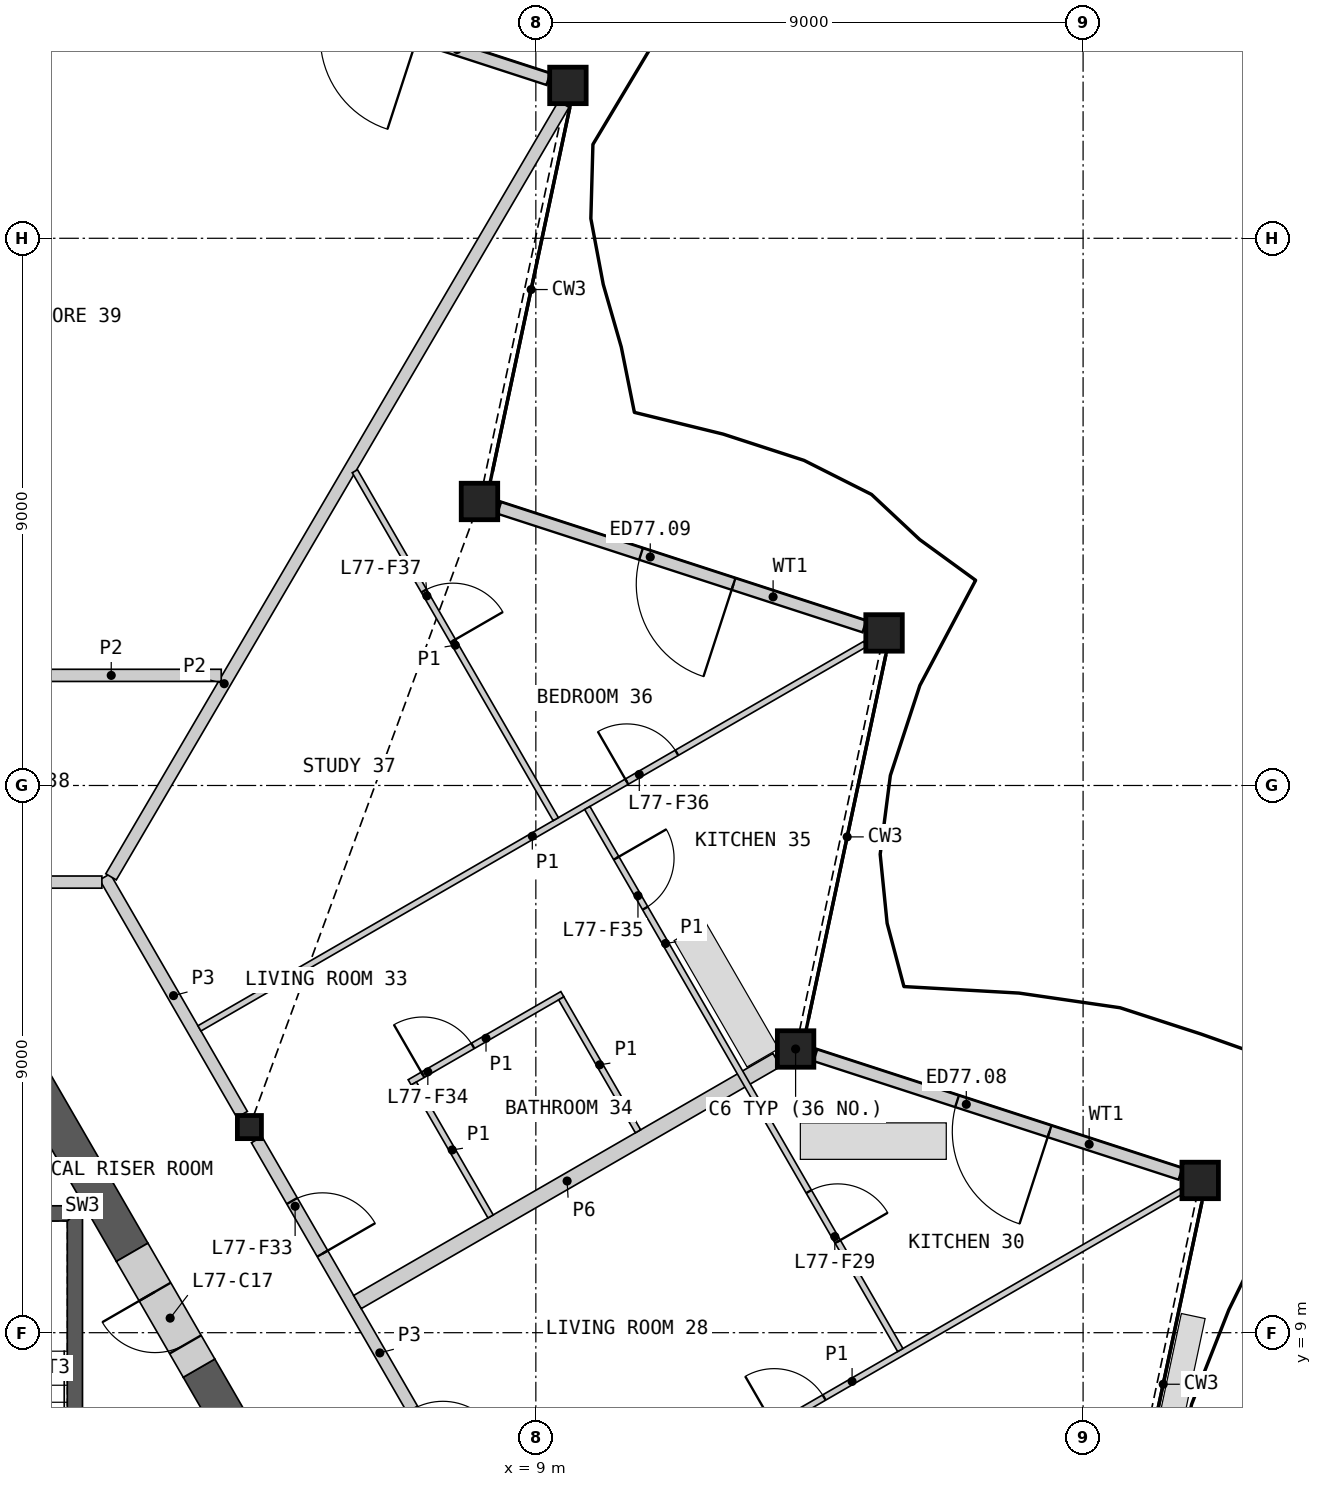
"""IFC4 building model, lengths in metres.
Left out: names, types, materials, properties, quantities, classifications, styles, units other than length and angle.
Written with IfcOpenShell. Run it as: python <this file> out.ifc"""

import sys

from ifc_helpers import new_model, si_unit, direction, frame, frame_2d, origin, origin_2d, place, context, subcontext, project, spatial, polyline, rectangle, hollow_rectangle, i_section, outline, extrude, element, fill, save


model = new_model("IFC4")
c1 = context("Model", 3, precision=1e-05, world=origin(), true_north=direction((0.0, 1.0)))
c2 = subcontext(c1, "Body", "Model", "MODEL_VIEW")
j1 = project(units=[si_unit("LENGTHUNIT", "METRE"), si_unit("PLANEANGLEUNIT", "RADIAN")], contexts=[c1])
p1 = place(None, origin())
s1 = spatial("IfcSite", under=j1, at=p1, CompositionType="ELEMENT")
p2 = place(p1, origin())
s2 = spatial("IfcBuilding", under=s1, at=p2, CompositionType="ELEMENT")
p3 = place(p2, frame((0.0, 0.0, 342.6)))
s3 = spatial("IfcBuildingStorey", under=s2, at=p3, CompositionType="ELEMENT", Elevation=342.6)
for number, where, z_axis, x_axis in (
    (1, (19.926, 11.504, 0.0), (0.0, 0.0, 1.0), (1.0, 0.0, 0.0)),
    (2, (13.272, 13.666, 0.0), (0.0, 0.0, 1.0), (1.0, 0.0, 0.0)),
    (3, (14.727, 20.509, 0.0), (0.0, 0.0, 1.0), (1.0, 0.0, 0.0)),
    (4, (8.073, 22.671, 0.0), (0.0, 0.0, 1.0), (1.0, 0.0, 0.0)),
    (5, (9.527, 29.514, 0.0), (0.0, 0.0, 1.0), (1.0, 0.0, 0.0)),
):
    element("IfcColumn", number, at=place(p3, frame(where, z_axis=z_axis, x_axis=x_axis)), inside=s3, PredefinedType="COLUMN", context=c2, shape_type="SweptSolid", body=[
        extrude(hollow_rectangle(XDim=0.6, YDim=0.6, WallThickness=0.04, at=origin_2d()), origin(), (0.0, 0.0, 1.0), 3.4),
    ])
p4 = place(p3, frame((4.289, 12.382, 0.0), z_axis=(0.0, 0.0, 1.0), x_axis=(1.0, 0.0, 0.0)))
e6 = element("IfcColumn", 6, at=p4, inside=s3, PredefinedType="COLUMN", context=c2, shape_type="SweptSolid", body=[
    extrude(i_section(OverallWidth=0.396, OverallDepth=0.381, WebThickness=0.019, FlangeThickness=0.03, at=origin_2d()), origin(), (0.0, 0.0, 1.0), 3.4),
])
p5 = place(p3, frame((19.601, 11.612, 0.0), z_axis=(0.0, 0.0, 1.0), x_axis=(-0.951065041052, 0.308990756638, 0.0)))
e7 = element("IfcWall", 7, at=p5, inside=s3, PredefinedType="SOLIDWALL", context=c2, shape_type="SweptSolid", body=[
    extrude(rectangle(XDim=6.313, YDim=0.2, at=frame_2d((3.156, 0.0))), origin(), (0.0, 0.0, 1.0), 2.488),
])
p6 = place(p5, frame((2.263, 0.0, 0.0)))
e8 = element("IfcOpeningElement", 8, at=p6, cuts=e7, PredefinedType="OPENING", context=c2, shape_type="SweptSolid", body=[
    extrude(rectangle(XDim=1.6, YDim=2.25, at=frame_2d((0.8, 1.125))), frame((0.0, 0.11, 0.0), z_axis=(0.0, -1.0, 0.0), x_axis=(1.0, 0.0, 0.0)), (0.0, 0.0, 1.0), 0.22),
])
p7 = place(p3, frame((14.403, 20.614, 0.0), z_axis=(0.0, 0.0, 1.0), x_axis=(-0.951053103012, 0.309027499182, 0.0)))
e9 = element("IfcWall", 9, at=p7, inside=s3, PredefinedType="SOLIDWALL", context=c2, shape_type="SweptSolid", body=[
    extrude(rectangle(XDim=6.315, YDim=0.2, at=frame_2d((3.157, 0.0))), origin(), (0.0, 0.0, 1.0), 2.488),
])
p8 = place(p7, frame((2.263, 0.0, 0.0)))
e10 = element("IfcOpeningElement", 10, at=p8, cuts=e9, PredefinedType="OPENING", context=c2, shape_type="SweptSolid", body=[
    extrude(rectangle(XDim=1.6, YDim=2.25, at=frame_2d((0.8, 1.125))), frame((0.0, 0.11, 0.0), z_axis=(0.0, -1.0, 0.0), x_axis=(1.0, 0.0, 0.0)), (0.0, 0.0, 1.0), 0.22),
])
p9 = place(p3, frame((9.206, 29.616, 0.0), z_axis=(0.0, 0.0, 1.0), x_axis=(-0.951056221468, 0.309017901757, 0.0)))
e11 = element("IfcWall", 11, at=p9, inside=s3, PredefinedType="SOLIDWALL", context=c2, shape_type="SweptSolid", body=[
    extrude(rectangle(XDim=6.316, YDim=0.2, at=frame_2d((3.158, 0.0))), origin(), (0.0, 0.0, 1.0), 2.488),
])
p10 = place(p9, frame((2.263, 0.0, 0.0)))
e12 = element("IfcOpeningElement", 12, at=p10, cuts=e11, PredefinedType="OPENING", context=c2, shape_type="SweptSolid", body=[
    extrude(rectangle(XDim=1.6, YDim=2.25, at=frame_2d((0.8, 1.125))), frame((0.0, 0.11, 0.0), z_axis=(0.0, -1.0, 0.0), x_axis=(1.0, 0.0, 0.0)), (0.0, 0.0, 1.0), 0.22),
])
p11 = place(p3, origin())
e13 = element("IfcWall", 13, at=p11, inside=s3, PredefinedType="SHEAR", context=c2, shape_type="SweptSolid", body=[
    extrude(outline(polyline([(1.544, 5.237), (1.544, 11.087), (1.294, 10.837), (1.294, 5.237), (1.544, 5.237)])), origin(), (0.0, 0.0, 1.0), 3.1),
])
p12 = place(p3, origin())
e14 = element("IfcWall", 14, at=p12, inside=s3, PredefinedType="SHEAR", context=c2, shape_type="SweptSolid", body=[
    extrude(outline(polyline([(1.544, 11.087), (-1.544, 11.087), (-1.294, 10.837), (1.294, 10.837), (1.544, 11.087)])), origin(), (0.0, 0.0, 1.0), 3.1),
])
p13 = place(p3, frame((8.686, -0.634, 0.0), z_axis=(0.0, 0.0, 1.0), x_axis=(-0.50001836461, 0.866014800712, 0.0)))
e15 = element("IfcWall", 15, at=p13, inside=s3, PredefinedType="SHEAR", context=c2, shape_type="SweptSolid", body=[
    extrude(rectangle(XDim=10.451, YDim=0.6, at=frame_2d((5.225, 0.0))), origin(), (0.0, 0.0, 1.0), 3.1),
])
p14 = place(p3, frame((2.361, 10.322, 0.0), z_axis=(0.0, 0.0, 1.0), x_axis=(-0.500000735859, 0.866024978935, 0.0)))
e16 = element("IfcWall", 16, at=p14, inside=s3, PredefinedType="SHEAR", context=c2, shape_type="SweptSolid", body=[
    extrude(rectangle(XDim=4.202, YDim=0.6, at=frame_2d((2.101, 0.0))), origin(), (0.0, 0.0, 1.0), 3.1),
])
p15 = place(p3, frame((3.461, 8.417, 0.0), z_axis=(0.0, 0.0, 1.0), x_axis=(-0.499946605688, 0.86605622881, 0.0)))
e17 = element("IfcWall", 17, at=p15, inside=s3, PredefinedType="SHEAR", context=c2, shape_type="SweptSolid", body=[
    extrude(rectangle(XDim=2.2, YDim=0.6, at=frame_2d((1.1, 0.0))), origin(), (0.0, 0.0, 1.0), 3.1),
])
p16 = place(p15, frame((0.45, 0.0, 0.0)))
e18 = element("IfcOpeningElement", 18, at=p16, cuts=e17, PredefinedType="OPENING", context=c2, shape_type="SweptSolid", body=[
    extrude(rectangle(XDim=1.0, YDim=2.1, at=frame_2d((0.5, 1.05))), frame((0.0, 0.31, 0.0), z_axis=(0.0, -1.0, 0.0), x_axis=(1.0, 0.0, 0.0)), (0.0, 0.0, 1.0), 0.62),
])
p17 = place(p3, frame((4.409, 12.174, 0.0), z_axis=(0.0, 0.0, 1.0), x_axis=(0.499984266882, -0.866034487114, 0.0)))
e19 = element("IfcWall", 19, at=p17, inside=s3, PredefinedType="PARTITIONING", context=c2, shape_type="SweptSolid", body=[
    extrude(rectangle(XDim=8.099, YDim=0.2, at=frame_2d((4.049, 0.0))), origin(), (0.0, 0.0, 1.0), 3.1),
])
p18 = place(p17, frame((5.123, 0.0, 0.0)))
e20 = element("IfcOpeningElement", 20, at=p18, cuts=e19, PredefinedType="OPENING", context=c2, shape_type="SweptSolid", body=[
    extrude(rectangle(XDim=1.0, YDim=2.1, at=frame_2d((0.5, 1.05))), frame((0.0, 0.11, 0.0), z_axis=(0.0, -1.0, 0.0), x_axis=(1.0, 0.0, 0.0)), (0.0, 0.0, 1.0), 0.22),
])
p19 = place(p17, frame((1.164, 0.0, 0.0)))
e21 = element("IfcOpeningElement", 21, at=p19, cuts=e19, PredefinedType="OPENING", context=c2, shape_type="SweptSolid", body=[
    extrude(rectangle(XDim=1.0, YDim=2.1, at=frame_2d((0.5, 1.05))), frame((0.0, 0.11, 0.0), z_axis=(0.0, -1.0, 0.0), x_axis=(1.0, 0.0, 0.0)), (0.0, 0.0, 1.0), 0.22),
])
p20 = place(p3, frame((6.066, 9.504, 0.0), z_axis=(0.0, 0.0, 1.0), x_axis=(0.866021168401, 0.500007335828, 0.0)))
e22 = element("IfcWall", 22, at=p20, inside=s3, PredefinedType="PARTITIONING", context=c2, shape_type="SweptSolid", body=[
    extrude(rectangle(XDim=7.962, YDim=0.25, at=frame_2d((3.981, 0.0))), origin(), (0.0, 0.0, 1.0), 2.33),
])
p21 = place(p3, frame((1.913, 16.498, 0.0), z_axis=(0.0, 0.0, 1.0), x_axis=(0.499950370306, -0.866054055606, 0.0)))
e23 = element("IfcWall", 23, at=p21, inside=s3, PredefinedType="PARTITIONING", context=c2, shape_type="SweptSolid", body=[
    extrude(rectangle(XDim=4.513, YDim=0.2, at=frame_2d((2.256, 0.0))), origin(), (0.0, 0.0, 1.0), 3.1),
])
p22 = place(p3, frame((-1.863, 16.411, 0.0), z_axis=(0.0, 0.0, 1.0), x_axis=(1.0, 0.0, 0.0)))
e24 = element("IfcWall", 24, at=p22, inside=s3, PredefinedType="PARTITIONING", context=c2, shape_type="SweptSolid", body=[
    extrude(rectangle(XDim=3.726, YDim=0.2, at=frame_2d((1.863, 0.0))), origin(), (0.0, 0.0, 1.0), 3.1),
])
p23 = place(p22, frame((1.388, 0.0, 0.0)))
e25 = element("IfcOpeningElement", 25, at=p23, cuts=e24, PredefinedType="OPENING", context=c2, shape_type="SweptSolid", body=[
    extrude(rectangle(XDim=0.95, YDim=2.1, at=frame_2d((0.475, 1.05))), frame((0.0, 0.11, 0.0), z_axis=(0.0, -1.0, 0.0), x_axis=(1.0, 0.0, 0.0)), (0.0, 0.0, 1.0), 0.22),
])
p24 = place(p3, frame((2.014, 16.497, 0.0), z_axis=(0.0, 0.0, 1.0), x_axis=(0.5055676136, 0.862786988821, 0.0)))
e26 = element("IfcWall", 26, at=p24, inside=s3, PredefinedType="PARTITIONING", context=c2, shape_type="SweptSolid", body=[
    extrude(rectangle(XDim=14.728, YDim=0.2, at=frame_2d((7.364, 0.0))), origin(), (0.0, 0.0, 1.0), 2.33),
])
p25 = place(p3, frame((0.208, 19.811, 0.0), z_axis=(0.0, 0.0, 1.0), x_axis=(1.0, 0.0, 0.0)))
e27 = element("IfcWall", 27, at=p25, inside=s3, PredefinedType="PARTITIONING", context=c2, shape_type="SweptSolid", body=[
    extrude(rectangle(XDim=3.618, YDim=0.2, at=frame_2d((1.809, 0.0))), origin(), (0.0, 0.0, 1.0), 2.33),
])
p26 = place(p3, frame((3.468, 14.005, 0.0), z_axis=(0.0, 0.0, 1.0), x_axis=(0.866020616849, 0.500008291124, 0.0)))
e28 = element("IfcWall", 28, at=p26, inside=s3, PredefinedType="PARTITIONING", context=c2, shape_type="SweptSolid", body=[
    extrude(rectangle(XDim=12.643, YDim=0.1, at=frame_2d((6.321, 0.0))), origin(), (0.0, 0.0, 1.0), 2.33),
])
p27 = place(p26, frame((8.115, 0.0, 0.0)))
e29 = element("IfcOpeningElement", 29, at=p27, cuts=e28, PredefinedType="OPENING", context=c2, shape_type="SweptSolid", body=[
    extrude(rectangle(XDim=0.95, YDim=2.1, at=frame_2d((0.475, 1.05))), frame((0.0, 0.06, 0.0), z_axis=(0.0, -1.0, 0.0), x_axis=(1.0, 0.0, 0.0)), (0.0, 0.0, 1.0), 0.12),
])
p28 = place(p3, frame((8.786, 5.073, 0.0), z_axis=(0.0, 0.0, 1.0), x_axis=(0.86602139559, 0.500006942333, 0.0)))
e30 = element("IfcWall", 30, at=p28, inside=s3, PredefinedType="PARTITIONING", context=c2, shape_type="SweptSolid", body=[
    extrude(rectangle(XDim=12.505, YDim=0.1, at=frame_2d((6.252, 0.0))), origin(), (0.0, 0.0, 1.0), 2.33),
])
p29 = place(p28, frame((4.772, 0.0, 0.0)))
e31 = element("IfcOpeningElement", 31, at=p29, cuts=e30, PredefinedType="OPENING", context=c2, shape_type="SweptSolid", body=[
    extrude(rectangle(XDim=0.95, YDim=2.1, at=frame_2d((0.475, 1.05))), frame((0.0, 0.06, 0.0), z_axis=(0.0, -1.0, 0.0), x_axis=(1.0, 0.0, 0.0)), (0.0, 0.0, 1.0), 0.12),
])
p30 = place(p3, frame((9.846, 17.63, 0.0), z_axis=(0.0, 0.0, 1.0), x_axis=(0.500013259472, -0.866017748289, 0.0)))
e32 = element("IfcWall", 32, at=p30, inside=s3, PredefinedType="PARTITIONING", context=c2, shape_type="SweptSolid", body=[
    extrude(rectangle(XDim=10.295, YDim=0.1, at=frame_2d((5.147, 0.0))), origin(), (0.0, 0.0, 1.0), 2.33),
])
p31 = place(p30, frame((7.286, 0.0, 0.0)))
e33 = element("IfcOpeningElement", 33, at=p31, cuts=e32, PredefinedType="OPENING", context=c2, shape_type="SweptSolid", body=[
    extrude(rectangle(XDim=0.95, YDim=2.1, at=frame_2d((0.475, 1.05))), frame((0.0, 0.06, 0.0), z_axis=(0.0, -1.0, 0.0), x_axis=(1.0, 0.0, 0.0)), (0.0, 0.0, 1.0), 0.12),
])
p32 = place(p30, frame((0.954, 0.0, 0.0)))
e34 = element("IfcOpeningElement", 34, at=p32, cuts=e32, PredefinedType="OPENING", context=c2, shape_type="SweptSolid", body=[
    extrude(rectangle(XDim=0.95, YDim=2.1, at=frame_2d((0.475, 1.05))), frame((0.0, 0.06, 0.0), z_axis=(0.0, -1.0, 0.0), x_axis=(1.0, 0.0, 0.0)), (0.0, 0.0, 1.0), 0.12),
])
p33 = place(p3, frame((6.024, 23.169, 0.0), z_axis=(0.0, 0.0, 1.0), x_axis=(0.499997497522, -0.866026848586, 0.0)))
e35 = element("IfcWall", 35, at=p33, inside=s3, PredefinedType="PARTITIONING", context=c2, shape_type="SweptSolid", body=[
    extrude(rectangle(XDim=6.608, YDim=0.1, at=frame_2d((3.304, 0.0))), origin(), (0.0, 0.0, 1.0), 2.33),
])
p34 = place(p33, frame((2.273, 0.0, 0.0)))
e36 = element("IfcOpeningElement", 36, at=p34, cuts=e35, PredefinedType="OPENING", context=c2, shape_type="SweptSolid", body=[
    extrude(rectangle(XDim=0.95, YDim=2.1, at=frame_2d((0.475, 1.05))), frame((0.0, 0.06, 0.0), z_axis=(0.0, -1.0, 0.0), x_axis=(1.0, 0.0, 0.0)), (0.0, 0.0, 1.0), 0.12),
])
p35 = place(p3, frame((6.925, 13.117, 0.0), z_axis=(0.0, 0.0, 1.0), x_axis=(0.866011727401, 0.500023687443, 0.0)))
e37 = element("IfcWall", 37, at=p35, inside=s3, PredefinedType="PARTITIONING", context=c2, shape_type="SweptSolid", body=[
    extrude(rectangle(XDim=2.9, YDim=0.1, at=frame_2d((1.45, 0.0))), origin(), (0.0, 0.0, 1.0), 2.33),
])
p36 = place(p35, frame((0.25, 0.0, 0.0)))
e38 = element("IfcOpeningElement", 38, at=p36, cuts=e37, PredefinedType="OPENING", context=c2, shape_type="SweptSolid", body=[
    extrude(rectangle(XDim=0.95, YDim=2.1, at=frame_2d((0.475, 1.05))), frame((0.0, 0.06, 0.0), z_axis=(0.0, -1.0, 0.0), x_axis=(1.0, 0.0, 0.0)), (0.0, 0.0, 1.0), 0.12),
])
p37 = place(p3, frame((9.418, 14.499, 0.0), z_axis=(0.0, 0.0, 1.0), x_axis=(0.500090717682, -0.865973021571, 0.0)))
e39 = element("IfcWall", 39, at=p37, inside=s3, PredefinedType="PARTITIONING", context=c2, shape_type="SweptSolid", body=[
    extrude(rectangle(XDim=2.525, YDim=0.1, at=frame_2d((1.262, 0.0))), origin(), (0.0, 0.0, 1.0), 2.33),
])
p38 = place(p3, frame((6.993, 13.099, 0.0), z_axis=(0.0, 0.0, 1.0), x_axis=(0.500048846702, -0.865997200291, 0.0)))
e40 = element("IfcWall", 40, at=p38, inside=s3, PredefinedType="PARTITIONING", context=c2, shape_type="SweptSolid", body=[
    extrude(rectangle(XDim=2.525, YDim=0.1, at=frame_2d((1.263, 0.0))), origin(), (0.0, 0.0, 1.0), 2.33),
])
p39 = place(p6, origin())
e41 = element("IfcDoor", 41, at=p39, inside=s3, OperationType="DOUBLE_DOOR_SINGLE_SWING", PredefinedType="DOOR", context=c2, shape_type="SweptSolid", body=[
    extrude(rectangle(XDim=1.6, YDim=2.25, at=frame_2d((0.8, 1.125))), frame((0.0, 0.025, 0.0), z_axis=(0.0, -1.0, 0.0), x_axis=(1.0, 0.0, 0.0)), (0.0, 0.0, 1.0), 0.05),
])
fill(e8, e41)
p40 = place(p8, origin())
e42 = element("IfcDoor", 42, at=p40, inside=s3, OperationType="DOUBLE_DOOR_SINGLE_SWING", PredefinedType="DOOR", context=c2, shape_type="SweptSolid", body=[
    extrude(rectangle(XDim=1.6, YDim=2.25, at=frame_2d((0.8, 1.125))), frame((0.0, 0.025, 0.0), z_axis=(0.0, -1.0, 0.0), x_axis=(1.0, 0.0, 0.0)), (0.0, 0.0, 1.0), 0.05),
])
fill(e10, e42)
p41 = place(p16, origin())
e43 = element("IfcDoor", 43, at=p41, inside=s3, OperationType="SINGLE_SWING_RIGHT", PredefinedType="DOOR", context=c2, shape_type="SweptSolid", body=[
    extrude(rectangle(XDim=1.0, YDim=2.1, at=frame_2d((0.5, 1.05))), frame((0.0, 0.055, 0.0), z_axis=(0.0, -1.0, 0.0), x_axis=(1.0, 0.0, 0.0)), (0.0, 0.0, 1.0), 0.05),
])
fill(e18, e43)
p42 = place(p31, origin())
e44 = element("IfcDoor", 44, at=p42, inside=s3, OperationType="SINGLE_SWING_RIGHT", PredefinedType="DOOR", context=c2, shape_type="SweptSolid", body=[
    extrude(rectangle(XDim=0.95, YDim=2.1, at=frame_2d((0.475, 1.05))), frame((0.0, 0.025, 0.0), z_axis=(0.0, -1.0, 0.0), x_axis=(1.0, 0.0, 0.0)), (0.0, 0.0, 1.0), 0.05),
])
fill(e33, e44)
p43 = place(p29, origin())
e45 = element("IfcDoor", 45, at=p43, inside=s3, OperationType="SINGLE_SWING_LEFT", PredefinedType="DOOR", context=c2, shape_type="SweptSolid", body=[
    extrude(rectangle(XDim=0.95, YDim=2.1, at=frame_2d((0.475, 1.05))), frame((0.0, 0.025, 0.0), z_axis=(0.0, -1.0, 0.0), x_axis=(1.0, 0.0, 0.0)), (0.0, 0.0, 1.0), 0.05),
])
fill(e31, e45)
p44 = place(p19, origin())
e46 = element("IfcDoor", 46, at=p44, inside=s3, OperationType="SINGLE_SWING_RIGHT", PredefinedType="DOOR", context=c2, shape_type="SweptSolid", body=[
    extrude(rectangle(XDim=1.0, YDim=2.1, at=frame_2d((0.5, 1.05))), frame((0.0, 0.025, 0.0), z_axis=(0.0, -1.0, 0.0), x_axis=(1.0, 0.0, 0.0)), (0.0, 0.0, 1.0), 0.05),
])
fill(e21, e46)
p45 = place(p36, origin())
e47 = element("IfcDoor", 47, at=p45, inside=s3, OperationType="SINGLE_SWING_LEFT", PredefinedType="DOOR", context=c2, shape_type="SweptSolid", body=[
    extrude(rectangle(XDim=0.95, YDim=2.1, at=frame_2d((0.475, 1.05))), frame((0.0, 0.025, 0.0), z_axis=(0.0, -1.0, 0.0), x_axis=(1.0, 0.0, 0.0)), (0.0, 0.0, 1.0), 0.05),
])
fill(e38, e47)
p46 = place(p32, origin())
e48 = element("IfcDoor", 48, at=p46, inside=s3, OperationType="SINGLE_SWING_LEFT", PredefinedType="DOOR", context=c2, shape_type="SweptSolid", body=[
    extrude(rectangle(XDim=0.95, YDim=2.1, at=frame_2d((0.475, 1.05))), frame((0.0, 0.025, 0.0), z_axis=(0.0, -1.0, 0.0), x_axis=(1.0, 0.0, 0.0)), (0.0, 0.0, 1.0), 0.05),
])
fill(e34, e48)
p47 = place(p27, origin())
e49 = element("IfcDoor", 49, at=p47, inside=s3, OperationType="SINGLE_SWING_LEFT", PredefinedType="DOOR", context=c2, shape_type="SweptSolid", body=[
    extrude(rectangle(XDim=0.95, YDim=2.1, at=frame_2d((0.475, 1.05))), frame((0.0, 0.025, 0.0), z_axis=(0.0, -1.0, 0.0), x_axis=(1.0, 0.0, 0.0)), (0.0, 0.0, 1.0), 0.05),
])
fill(e29, e49)
p48 = place(p34, origin())
e50 = element("IfcDoor", 50, at=p48, inside=s3, OperationType="SINGLE_SWING_RIGHT", PredefinedType="DOOR", context=c2, shape_type="SweptSolid", body=[
    extrude(rectangle(XDim=0.95, YDim=2.1, at=frame_2d((0.475, 1.05))), frame((0.0, 0.025, 0.0), z_axis=(0.0, -1.0, 0.0), x_axis=(1.0, 0.0, 0.0)), (0.0, 0.0, 1.0), 0.05),
])
fill(e36, e50)
save(model, sys.argv[1])
